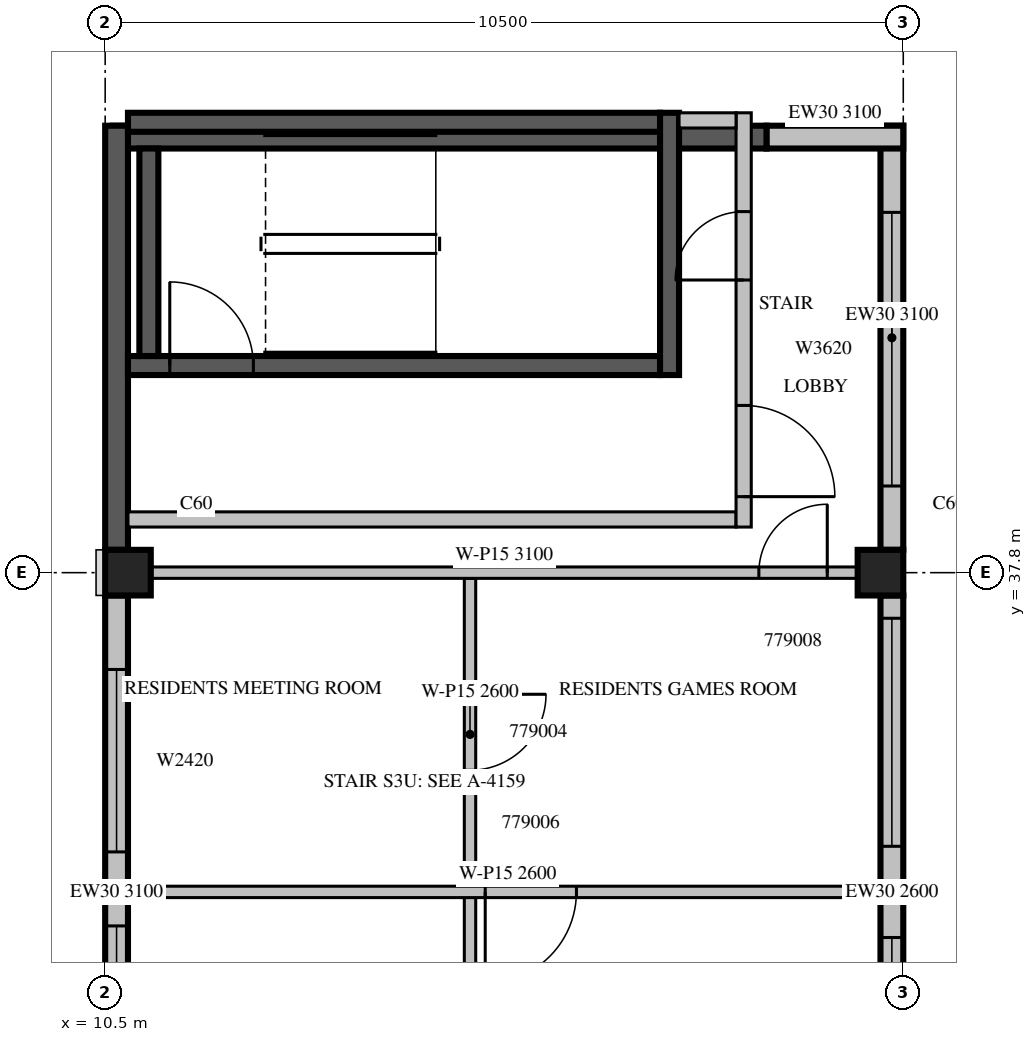
"""IFC4 building model, lengths in metres.
Left out: names, types, materials, properties, quantities, classifications, styles, units other than length and angle.
Written with IfcOpenShell. Run it as: python <this file> out.ifc"""

import sys

from ifc_helpers import new_model, si_unit, direction, frame, frame_2d, origin, origin_2d, place, context, subcontext, project, spatial, rectangle, extrude, source, transform, mapped, element, fill, save


model = new_model("IFC4")
c1 = context("Model", 3, precision=1e-05, world=origin(), true_north=direction((0.0, 1.0)))
c2 = subcontext(c1, "Body", "Model", "MODEL_VIEW")
j1 = project(units=[si_unit("LENGTHUNIT", "METRE"), si_unit("PLANEANGLEUNIT", "RADIAN")], contexts=[c1])
p1 = place(None, origin())
s1 = spatial("IfcSite", under=j1, at=p1, CompositionType="ELEMENT")
p2 = place(p1, origin())
s2 = spatial("IfcBuilding", under=s1, at=p2, CompositionType="ELEMENT")
p3 = place(p2, frame((0.0, 0.0, 337.0)))
s3 = spatial("IfcBuildingStorey", under=s2, at=p3, CompositionType="ELEMENT", Elevation=337.0)
m1 = source(origin(), c2, "Body", "SweptSolid", [
    extrude(rectangle(XDim=0.6, YDim=0.6, at=origin_2d()), origin(), (0.0, 0.0, 1.0), 3.5),
])
for number, where, z_axis, x_axis in (
    (1, (10.8, 37.8, 0.0), (0.0, 0.0, 1.0), (1.0, 0.0, 0.0)),
    (2, (20.7, 37.8, 0.0), (0.0, 0.0, 1.0), (1.0, 0.0, 0.0)),
):
    element("IfcColumn", number, at=place(p3, frame(where, z_axis=z_axis, x_axis=x_axis)), inside=s3, PredefinedType="COLUMN", context=c2, shape_type="MappedRepresentation", body=[
        mapped(m1, transform((0.0, 0.0, 0.0), scale=1.0)),
    ])
m2 = source(origin(), c2, "Body", "SweptSolid", [
    extrude(rectangle(XDim=7.8, YDim=0.3, at=frame_2d((3.9, 0.0))), origin(), (0.0, 0.0, 1.0), 2.6),
])
p4 = place(p3, frame((20.85, 29.7, 0.0), z_axis=(0.0, 0.0, 1.0), x_axis=(0.0, 1.0, 0.0)))
e3 = element("IfcWall", 3, at=p4, inside=s3, PredefinedType="STANDARD", context=c2, shape_type="MappedRepresentation", body=[
    mapped(m2, transform((0.0, 0.0, 0.0), scale=1.0)),
])
m3 = source(origin(), c2, "Body", "SweptSolid", [
    extrude(rectangle(XDim=3.0, YDim=2.0, at=frame_2d((1.5, 1.0))), frame((0.0, 0.16, 0.0), z_axis=(0.0, -1.0, 0.0), x_axis=(1.0, 0.0, 0.0)), (0.0, 0.0, 1.0), 0.32),
])
p5 = place(p4, frame((0.3, 0.0, 0.6)))
e4 = element("IfcOpeningElement", 4, at=p5, cuts=e3, PredefinedType="OPENING", context=c2, shape_type="MappedRepresentation", body=[
    mapped(m3, transform((0.0, 0.0, 0.0), scale=1.0)),
])
p6 = place(p4, frame((4.5, 0.0, 0.6)))
e5 = element("IfcOpeningElement", 5, at=p6, cuts=e3, PredefinedType="OPENING", context=c2, shape_type="MappedRepresentation", body=[
    mapped(m3, transform((0.0, 0.0, 0.0), scale=1.0)),
])
m4 = source(origin(), c2, "Body", "SweptSolid", [
    extrude(rectangle(XDim=5.58, YDim=0.3, at=frame_2d((2.79, 0.0))), origin(), (0.0, 0.0, 1.0), 3.1),
])
p7 = place(p3, frame((20.85, 38.1, 0.0), z_axis=(0.0, 0.0, 1.0), x_axis=(0.0, 1.0, 0.0)))
e6 = element("IfcWall", 6, at=p7, inside=s3, PredefinedType="STANDARD", context=c2, shape_type="MappedRepresentation", body=[
    mapped(m4, transform((0.0, 0.0, 0.0), scale=1.0)),
])
m5 = source(origin(), c2, "Body", "SweptSolid", [
    extrude(rectangle(XDim=3.6, YDim=2.0, at=frame_2d((1.8, 1.0))), frame((0.0, 0.16, 0.0), z_axis=(0.0, -1.0, 0.0), x_axis=(1.0, 0.0, 0.0)), (0.0, 0.0, 1.0), 0.32),
])
p8 = place(p7, frame((0.84, 0.0, 0.6)))
e7 = element("IfcOpeningElement", 7, at=p8, cuts=e6, PredefinedType="OPENING", context=c2, shape_type="MappedRepresentation", body=[
    mapped(m5, transform((0.0, 0.0, 0.0), scale=1.0)),
])
m6 = source(origin(), c2, "Body", "SweptSolid", [
    extrude(rectangle(XDim=1.8, YDim=0.3, at=frame_2d((0.9, 0.0))), origin(), (0.0, 0.0, 1.0), 3.1),
])
p9 = place(p3, frame((21.0, 43.53, 0.0), z_axis=(0.0, 0.0, 1.0), x_axis=(-1.0, 0.0, 0.0)))
e8 = element("IfcWall", 8, at=p9, inside=s3, PredefinedType="STANDARD", context=c2, shape_type="MappedRepresentation", body=[
    mapped(m6, transform((0.0, 0.0, 0.0), scale=1.0)),
])
m7 = source(origin(), c2, "Body", "SweptSolid", [
    extrude(rectangle(XDim=8.6, YDim=0.3, at=frame_2d((4.3, 0.0))), origin(), (0.0, 0.0, 1.0), 3.1),
])
p10 = place(p3, frame((19.2, 43.53, 0.0), z_axis=(0.0, 0.0, 1.0), x_axis=(-1.0, 0.0, 0.0)))
e9 = element("IfcWall", 9, at=p10, inside=s3, PredefinedType="SOLIDWALL", context=c2, shape_type="MappedRepresentation", body=[
    mapped(m7, transform((0.0, 0.0, 0.0), scale=1.0)),
])
m8 = source(origin(), c2, "Body", "SweptSolid", [
    extrude(rectangle(XDim=5.58, YDim=0.3, at=frame_2d((2.79, 0.0))), origin(), (0.0, 0.0, 1.0), 3.1),
])
p11 = place(p3, frame((10.65, 43.68, 0.0), z_axis=(0.0, 0.0, 1.0), x_axis=(0.0, -1.0, 0.0)))
e10 = element("IfcWall", 10, at=p11, inside=s3, PredefinedType="SOLIDWALL", context=c2, shape_type="MappedRepresentation", body=[
    mapped(m8, transform((0.0, 0.0, 0.0), scale=1.0)),
])
m9 = source(origin(), c2, "Body", "SweptSolid", [
    extrude(rectangle(XDim=7.8, YDim=0.3, at=frame_2d((3.9, 0.0))), origin(), (0.0, 0.0, 1.0), 3.1),
])
p12 = place(p3, frame((10.65, 37.5, 0.0), z_axis=(0.0, 0.0, 1.0), x_axis=(0.0, -1.0, 0.0)))
e11 = element("IfcWall", 11, at=p12, inside=s3, PredefinedType="STANDARD", context=c2, shape_type="MappedRepresentation", body=[
    mapped(m9, transform((0.0, 0.0, 0.0), scale=1.0)),
])
m10 = source(origin(), c2, "Body", "SweptSolid", [
    extrude(rectangle(XDim=1.2, YDim=2.0, at=frame_2d((0.6, 1.0))), frame((0.0, 0.16, 0.0), z_axis=(0.0, -1.0, 0.0), x_axis=(1.0, 0.0, 0.0)), (0.0, 0.0, 1.0), 0.32),
])
p13 = place(p12, frame((4.348, 0.0, 0.6)))
e12 = element("IfcOpeningElement", 12, at=p13, cuts=e11, PredefinedType="OPENING", context=c2, shape_type="MappedRepresentation", body=[
    mapped(m10, transform((0.0, 0.0, 0.0), scale=1.0)),
])
m11 = source(origin(), c2, "Body", "SweptSolid", [
    extrude(rectangle(XDim=2.4, YDim=2.0, at=frame_2d((1.2, 1.0))), frame((0.0, 0.16, 0.0), z_axis=(0.0, -1.0, 0.0), x_axis=(1.0, 0.0, 0.0)), (0.0, 0.0, 1.0), 0.32),
])
p14 = place(p12, frame((0.974, 0.0, 0.6)))
e13 = element("IfcOpeningElement", 13, at=p14, cuts=e11, PredefinedType="OPENING", context=c2, shape_type="MappedRepresentation", body=[
    mapped(m11, transform((0.0, 0.0, 0.0), scale=1.0)),
])
m12 = source(origin(), c2, "Body", "SweptSolid", [
    extrude(rectangle(XDim=7.0, YDim=0.25, at=frame_2d((3.5, 0.0))), origin(), (0.0, 0.0, 1.0), 3.1),
])
p15 = place(p3, frame((10.8, 40.525, 0.0), z_axis=(0.0, 0.0, 1.0), x_axis=(1.0, 0.0, 0.0)))
e14 = element("IfcWall", 14, at=p15, inside=s3, PredefinedType="SOLIDWALL", context=c2, shape_type="MappedRepresentation", body=[
    mapped(m12, transform((0.0, 0.0, 0.0), scale=1.0)),
])
m13 = source(origin(), c2, "Body", "SweptSolid", [
    extrude(rectangle(XDim=1.1, YDim=2.1, at=frame_2d((0.55, 1.05))), frame((0.0, 0.135, 0.0), z_axis=(0.0, -1.0, 0.0), x_axis=(1.0, 0.0, 0.0)), (0.0, 0.0, 1.0), 0.27),
])
p16 = place(p15, frame((0.55, 0.0, 0.0)))
e15 = element("IfcOpeningElement", 15, at=p16, cuts=e14, PredefinedType="OPENING", context=c2, shape_type="MappedRepresentation", body=[
    mapped(m13, transform((0.0, 0.0, 0.0), scale=1.0)),
])
p17 = place(p3, frame((10.8, 43.725, 0.0), z_axis=(0.0, 0.0, 1.0), x_axis=(1.0, 0.0, 0.0)))
e16 = element("IfcWall", 16, at=p17, inside=s3, PredefinedType="SOLIDWALL", context=c2, shape_type="MappedRepresentation", body=[
    mapped(m12, transform((0.0, 0.0, 0.0), scale=1.0)),
])
m14 = source(origin(), c2, "Body", "SweptSolid", [
    extrude(rectangle(XDim=3.45, YDim=0.25, at=frame_2d((1.725, 0.0))), origin(), (0.0, 0.0, 1.0), 3.1),
])
p18 = place(p3, frame((17.925, 40.4, 0.0), z_axis=(0.0, 0.0, 1.0), x_axis=(0.0, 1.0, 0.0)))
e17 = element("IfcWall", 17, at=p18, inside=s3, PredefinedType="SOLIDWALL", context=c2, shape_type="MappedRepresentation", body=[
    mapped(m14, transform((0.0, 0.0, 0.0), scale=1.0)),
])
m15 = source(origin(), c2, "Body", "SweptSolid", [
    extrude(rectangle(XDim=2.73, YDim=0.25, at=frame_2d((1.365, 0.0))), origin(), (0.0, 0.0, 1.0), 3.1),
])
p19 = place(p3, frame((11.075, 40.65, 0.0), z_axis=(0.0, 0.0, 1.0), x_axis=(0.0, 1.0, 0.0)))
e18 = element("IfcWall", 18, at=p19, inside=s3, PredefinedType="SOLIDWALL", context=c2, shape_type="MappedRepresentation", body=[
    mapped(m15, transform((0.0, 0.0, 0.0), scale=1.0)),
])
m16 = source(origin(), c2, "Body", "SweptSolid", [
    extrude(rectangle(XDim=8.0, YDim=0.2, at=frame_2d((4.0, 0.0))), origin(), (0.0, 0.0, 1.0), 3.1),
])
p20 = place(p3, frame((10.8, 38.5, 0.0), z_axis=(0.0, 0.0, 1.0), x_axis=(1.0, 0.0, 0.0)))
e19 = element("IfcWall", 19, at=p20, inside=s3, PredefinedType="PARTITIONING", context=c2, shape_type="MappedRepresentation", body=[
    mapped(m16, transform((0.0, 0.0, 0.0), scale=1.0)),
])
m17 = source(origin(), c2, "Body", "SweptSolid", [
    extrude(rectangle(XDim=5.45, YDim=0.2, at=frame_2d((2.725, 0.0))), origin(), (0.0, 0.0, 1.0), 3.1),
])
p21 = place(p3, frame((18.9, 38.4, 0.0), z_axis=(0.0, 0.0, 1.0), x_axis=(0.0, 1.0, 0.0)))
e20 = element("IfcWall", 20, at=p21, inside=s3, PredefinedType="PARTITIONING", context=c2, shape_type="MappedRepresentation", body=[
    mapped(m17, transform((0.0, 0.0, 0.0), scale=1.0)),
])
m18 = source(origin(), c2, "Body", "SweptSolid", [
    extrude(rectangle(XDim=1.2, YDim=2.1, at=frame_2d((0.6, 1.05))), frame((0.0, 0.11, 0.0), z_axis=(0.0, -1.0, 0.0), x_axis=(1.0, 0.0, 0.0)), (0.0, 0.0, 1.0), 0.22),
])
p22 = place(p21, frame((0.4, 0.0, 0.0)))
e21 = element("IfcOpeningElement", 21, at=p22, cuts=e20, PredefinedType="OPENING", context=c2, shape_type="MappedRepresentation", body=[
    mapped(m18, transform((0.0, 0.0, 0.0), scale=1.0)),
])
m19 = source(origin(), c2, "Body", "SweptSolid", [
    extrude(rectangle(XDim=0.9, YDim=2.1, at=frame_2d((0.45, 1.05))), frame((0.0, 0.11, 0.0), z_axis=(0.0, -1.0, 0.0), x_axis=(1.0, 0.0, 0.0)), (0.0, 0.0, 1.0), 0.22),
])
p23 = place(p21, frame((3.25, 0.0, 0.0)))
e22 = element("IfcOpeningElement", 22, at=p23, cuts=e20, PredefinedType="OPENING", context=c2, shape_type="MappedRepresentation", body=[
    mapped(m19, transform((0.0, 0.0, 0.0), scale=1.0)),
])
m20 = source(origin(), c2, "Body", "SweptSolid", [
    extrude(rectangle(XDim=0.75, YDim=0.2, at=frame_2d((0.375, 0.0))), origin(), (0.0, 0.0, 1.0), 3.1),
])
p24 = place(p3, frame((18.05, 43.75, 0.0), z_axis=(0.0, 0.0, 1.0), x_axis=(1.0, 0.0, 0.0)))
e23 = element("IfcWall", 23, at=p24, inside=s3, PredefinedType="PARTITIONING", context=c2, shape_type="MappedRepresentation", body=[
    mapped(m20, transform((0.0, 0.0, 0.0), scale=1.0)),
])
p25 = place(p3, frame((15.3, 33.6, 0.0), z_axis=(0.0, 0.0, 1.0), x_axis=(0.0, -1.0, 0.0)))
e24 = element("IfcWall", 24, at=p25, inside=s3, PredefinedType="PARTITIONING", context=c2, shape_type="SweptSolid", body=[
    extrude(rectangle(XDim=4.2, YDim=0.15, at=frame_2d((2.1, 0.0))), origin(), (0.0, 0.0, 1.0), 2.6),
])
m21 = source(origin(), c2, "Body", "SweptSolid", [
    extrude(rectangle(XDim=1.0, YDim=2.1, at=frame_2d((0.5, 1.05))), frame((0.0, 0.085, 0.0), z_axis=(0.0, -1.0, 0.0), x_axis=(1.0, 0.0, 0.0)), (0.0, 0.0, 1.0), 0.17),
])
p26 = place(p25, frame((1.6, 0.0, 0.0)))
e25 = element("IfcOpeningElement", 25, at=p26, cuts=e24, PredefinedType="OPENING", context=c2, shape_type="MappedRepresentation", body=[
    mapped(m21, transform((0.0, 0.0, 0.0), scale=1.0)),
])
p27 = place(p3, frame((15.3, 37.725, 0.0), z_axis=(0.0, 0.0, 1.0), x_axis=(0.0, -1.0, 0.0)))
e26 = element("IfcWall", 26, at=p27, inside=s3, PredefinedType="PARTITIONING", context=c2, shape_type="SweptSolid", body=[
    extrude(rectangle(XDim=4.105, YDim=0.15, at=frame_2d((2.053, 0.0))), origin(), (0.0, 0.0, 1.0), 2.6),
])
p28 = place(p27, frame((1.525, 0.0, 0.0)))
e27 = element("IfcOpeningElement", 27, at=p28, cuts=e26, PredefinedType="OPENING", context=c2, shape_type="MappedRepresentation", body=[
    mapped(m21, transform((0.0, 0.0, 0.0), scale=1.0)),
])
p29 = place(p3, frame((10.8, 33.6, 0.0), z_axis=(0.0, 0.0, 1.0), x_axis=(1.0, 0.0, 0.0)))
e28 = element("IfcWall", 28, at=p29, inside=s3, PredefinedType="PARTITIONING", context=c2, shape_type="SweptSolid", body=[
    extrude(rectangle(XDim=9.995, YDim=0.15, at=frame_2d((4.997, 0.0))), origin(), (0.0, 0.0, 1.0), 2.6),
])
m22 = source(origin(), c2, "Body", "SweptSolid", [
    extrude(rectangle(XDim=1.2, YDim=2.1, at=frame_2d((0.6, 1.05))), frame((0.0, 0.085, 0.0), z_axis=(0.0, -1.0, 0.0), x_axis=(1.0, 0.0, 0.0)), (0.0, 0.0, 1.0), 0.17),
])
p30 = place(p29, frame((4.7, 0.0, 0.0)))
e29 = element("IfcOpeningElement", 29, at=p30, cuts=e28, PredefinedType="OPENING", context=c2, shape_type="MappedRepresentation", body=[
    mapped(m22, transform((0.0, 0.0, 0.0), scale=1.0)),
])
m23 = source(origin(), c2, "Body", "SweptSolid", [
    extrude(rectangle(XDim=9.302, YDim=0.15, at=frame_2d((4.651, 0.0))), origin(), (0.0, 0.0, 1.0), 3.1),
])
p31 = place(p3, frame((20.401, 37.8, 0.0), z_axis=(0.0, 0.0, 1.0), x_axis=(-1.0, 0.0, 0.0)))
e30 = element("IfcWall", 30, at=p31, inside=s3, PredefinedType="PARTITIONING", context=c2, shape_type="MappedRepresentation", body=[
    mapped(m23, transform((0.0, 0.0, 0.0), scale=1.0)),
])
m24 = source(origin(), c2, "Body", "SweptSolid", [
    extrude(rectangle(XDim=0.9, YDim=2.1, at=frame_2d((0.45, 1.05))), frame((0.0, 0.085, 0.0), z_axis=(0.0, -1.0, 0.0), x_axis=(1.0, 0.0, 0.0)), (0.0, 0.0, 1.0), 0.17),
])
p32 = place(p31, frame((0.401, 0.0, 0.0)))
e31 = element("IfcOpeningElement", 31, at=p32, cuts=e30, PredefinedType="OPENING", context=c2, shape_type="MappedRepresentation", body=[
    mapped(m24, transform((0.0, 0.0, 0.0), scale=1.0)),
])
m25 = source(origin(), c2, "Body", "SweptSolid", [
    extrude(rectangle(XDim=3.0, YDim=2.0, at=frame_2d((1.5, 1.0))), frame((0.0, 0.03, 0.0), z_axis=(0.0, -1.0, 0.0), x_axis=(1.0, 0.0, 0.0)), (0.0, 0.0, 1.0), 0.06),
])
p33 = place(p5, origin())
e32 = element("IfcWindow", 32, at=p33, inside=s3, PartitioningType="SINGLE_PANEL", PredefinedType="WINDOW", context=c2, shape_type="MappedRepresentation", body=[
    mapped(m25, transform((0.0, 0.0, 0.0), scale=1.0)),
])
fill(e4, e32)
p34 = place(p6, origin())
e33 = element("IfcWindow", 33, at=p34, inside=s3, PartitioningType="SINGLE_PANEL", PredefinedType="WINDOW", context=c2, shape_type="MappedRepresentation", body=[
    mapped(m25, transform((0.0, 0.0, 0.0), scale=1.0)),
])
fill(e5, e33)
m26 = source(origin(), c2, "Body", "SweptSolid", [
    extrude(rectangle(XDim=3.6, YDim=2.0, at=frame_2d((1.8, 1.0))), frame((0.0, 0.03, 0.0), z_axis=(0.0, -1.0, 0.0), x_axis=(1.0, 0.0, 0.0)), (0.0, 0.0, 1.0), 0.06),
])
p35 = place(p8, origin())
e34 = element("IfcWindow", 34, at=p35, inside=s3, PartitioningType="SINGLE_PANEL", PredefinedType="WINDOW", context=c2, shape_type="MappedRepresentation", body=[
    mapped(m26, transform((0.0, 0.0, 0.0), scale=1.0)),
])
fill(e7, e34)
m27 = source(origin(), c2, "Body", "SweptSolid", [
    extrude(rectangle(XDim=1.2, YDim=2.0, at=frame_2d((0.6, 1.0))), frame((0.0, 0.03, 0.0), z_axis=(0.0, -1.0, 0.0), x_axis=(1.0, 0.0, 0.0)), (0.0, 0.0, 1.0), 0.06),
])
p36 = place(p13, origin())
e35 = element("IfcWindow", 35, at=p36, inside=s3, PartitioningType="SINGLE_PANEL", PredefinedType="WINDOW", context=c2, shape_type="MappedRepresentation", body=[
    mapped(m27, transform((0.0, 0.0, 0.0), scale=1.0)),
])
fill(e12, e35)
m28 = source(origin(), c2, "Body", "SweptSolid", [
    extrude(rectangle(XDim=2.4, YDim=2.0, at=frame_2d((1.2, 1.0))), frame((0.0, 0.03, 0.0), z_axis=(0.0, -1.0, 0.0), x_axis=(1.0, 0.0, 0.0)), (0.0, 0.0, 1.0), 0.06),
])
p37 = place(p14, origin())
e36 = element("IfcWindow", 36, at=p37, inside=s3, PartitioningType="SINGLE_PANEL", PredefinedType="WINDOW", context=c2, shape_type="MappedRepresentation", body=[
    mapped(m28, transform((0.0, 0.0, 0.0), scale=1.0)),
])
fill(e13, e36)
m29 = source(origin(), c2, "Body", "SweptSolid", [
    extrude(rectangle(XDim=1.1, YDim=2.1, at=frame_2d((0.55, 1.05))), frame((0.0, 0.025, 0.0), z_axis=(0.0, -1.0, 0.0), x_axis=(1.0, 0.0, 0.0)), (0.0, 0.0, 1.0), 0.05),
])
p38 = place(p16, origin())
e37 = element("IfcDoor", 37, at=p38, inside=s3, OperationType="SINGLE_SWING_LEFT", PredefinedType="DOOR", context=c2, shape_type="MappedRepresentation", body=[
    mapped(m29, transform((0.0, 0.0, 0.0), scale=1.0)),
])
fill(e15, e37)
m30 = source(origin(), c2, "Body", "SweptSolid", [
    extrude(rectangle(XDim=1.2, YDim=2.1, at=frame_2d((0.6, 1.05))), frame((0.0, 0.025, 0.0), z_axis=(0.0, -1.0, 0.0), x_axis=(1.0, 0.0, 0.0)), (0.0, 0.0, 1.0), 0.05),
])
p39 = place(p22, origin())
e38 = element("IfcDoor", 38, at=p39, inside=s3, OperationType="SINGLE_SWING_RIGHT", PredefinedType="DOOR", context=c2, shape_type="MappedRepresentation", body=[
    mapped(m30, transform((0.0, 0.0, 0.0), scale=1.0)),
])
fill(e21, e38)
m31 = source(origin(), c2, "Body", "SweptSolid", [
    extrude(rectangle(XDim=0.9, YDim=2.1, at=frame_2d((0.45, 1.05))), frame((0.0, 0.025, 0.0), z_axis=(0.0, -1.0, 0.0), x_axis=(1.0, 0.0, 0.0)), (0.0, 0.0, 1.0), 0.05),
])
p40 = place(p23, origin())
e39 = element("IfcDoor", 39, at=p40, inside=s3, OperationType="SINGLE_SWING_LEFT", PredefinedType="DOOR", context=c2, shape_type="MappedRepresentation", body=[
    mapped(m31, transform((0.0, 0.0, 0.0), scale=1.0)),
])
fill(e22, e39)
m32 = source(origin(), c2, "Body", "SweptSolid", [
    extrude(rectangle(XDim=1.0, YDim=2.1, at=frame_2d((0.5, 1.05))), frame((0.0, 0.025, 0.0), z_axis=(0.0, -1.0, 0.0), x_axis=(1.0, 0.0, 0.0)), (0.0, 0.0, 1.0), 0.05),
])
p41 = place(p28, origin())
e40 = element("IfcDoor", 40, at=p41, inside=s3, OperationType="SINGLE_SWING_LEFT", PredefinedType="DOOR", context=c2, shape_type="MappedRepresentation", body=[
    mapped(m32, transform((0.0, 0.0, 0.0), scale=1.0)),
])
fill(e27, e40)
p42 = place(p30, origin())
e41 = element("IfcDoor", 41, at=p42, inside=s3, OperationType="SINGLE_SWING_RIGHT", PredefinedType="DOOR", context=c2, shape_type="MappedRepresentation", body=[
    mapped(m30, transform((0.0, 0.0, 0.0), scale=1.0)),
])
fill(e29, e41)
p43 = place(p32, origin())
e42 = element("IfcDoor", 42, at=p43, inside=s3, OperationType="SINGLE_SWING_RIGHT", PredefinedType="DOOR", context=c2, shape_type="MappedRepresentation", body=[
    mapped(m31, transform((0.0, 0.0, 0.0), scale=1.0)),
])
fill(e31, e42)
save(model, sys.argv[1])
